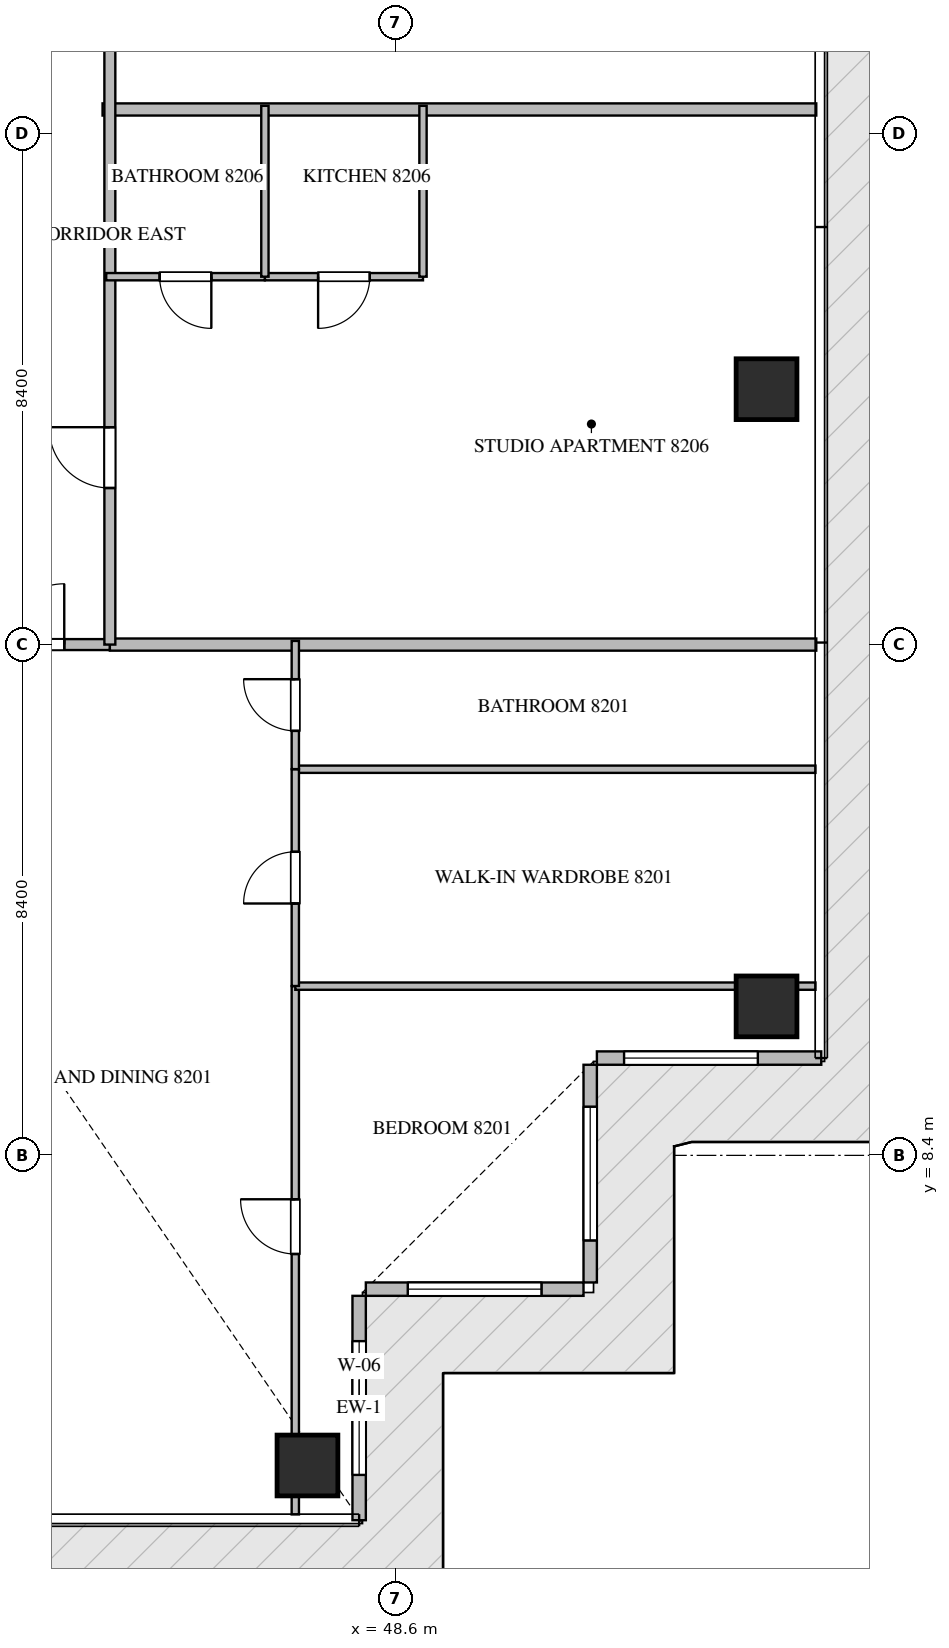
"""IFC4 building model, lengths in metres.
Left out: names, types, materials, properties, quantities, classifications, styles, units other than length and angle.
Written with IfcOpenShell. Run it as: python <this file> out.ifc"""

import sys

from ifc_helpers import new_model, si_unit, direction, frame, frame_2d, origin, origin_2d, place, context, subcontext, project, spatial, rectangle, extrude, source, transform, mapped, element, fill, save


model = new_model("IFC4")
c1 = context("Model", 3, precision=1e-05, world=origin(), true_north=direction((0.0, 1.0)))
c2 = subcontext(c1, "Body", "Model", "MODEL_VIEW")
j1 = project(units=[si_unit("LENGTHUNIT", "METRE"), si_unit("PLANEANGLEUNIT", "RADIAN")], contexts=[c1])
p1 = place(None, origin())
s1 = spatial("IfcSite", under=j1, at=p1, CompositionType="ELEMENT")
p2 = place(p1, origin())
s2 = spatial("IfcBuilding", under=s1, at=p2, CompositionType="ELEMENT")
p3 = place(p2, frame((0.0, 0.0, 329.9)))
s3 = spatial("IfcBuildingStorey", under=s2, at=p3, CompositionType="ELEMENT", Elevation=329.9)
m1 = source(origin(), c2, "Body", "SweptSolid", [
    extrude(rectangle(XDim=1.0, YDim=1.0, at=origin_2d()), origin(), (0.0, 0.0, 1.0), 4.05),
])
for number, where, z_axis, x_axis in (
    (1, (47.15, 3.3, -0.26), (0.0, 0.0, 1.0), (1.0, 0.0, 0.0)),
    (2, (54.7, 10.85, -0.26), (0.0, 0.0, 1.0), (1.0, 0.0, 0.0)),
    (3, (54.7, 21.0, -0.26), (0.0, 0.0, 1.0), (1.0, 0.0, 0.0)),
):
    element("IfcColumn", number, at=place(p3, frame(where, z_axis=z_axis, x_axis=x_axis)), inside=s3, PredefinedType="COLUMN", context=c2, shape_type="MappedRepresentation", body=[
        mapped(m1, transform((0.0, 0.0, 0.0), scale=1.0)),
    ])
p4 = place(p3, frame((48.0, 2.4, 0.0), z_axis=(0.0, 0.0, 1.0), x_axis=(0.0, 1.0, 0.0)))
e4 = element("IfcWall", 4, at=p4, inside=s3, PredefinedType="ELEMENTEDWALL", context=c2, shape_type="SweptSolid", body=[
    extrude(rectangle(XDim=3.69, YDim=0.22, at=frame_2d((1.845, 0.0))), origin(), (0.0, 0.0, 1.0), 3.775),
])
p5 = place(p4, frame((0.745, 0.0, 0.65)))
e5 = element("IfcOpeningElement", 5, at=p5, cuts=e4, PredefinedType="OPENING", context=c2, shape_type="SweptSolid", body=[
    extrude(rectangle(XDim=2.2, YDim=2.4, at=frame_2d((1.1, 1.2))), frame((0.0, 0.12, 0.0), z_axis=(0.0, -1.0, 0.0), x_axis=(1.0, 0.0, 0.0)), (0.0, 0.0, 1.0), 0.24),
])
p6 = place(p3, frame((48.11, 6.2, 0.0), z_axis=(0.0, 0.0, 1.0), x_axis=(1.0, 0.0, 0.0)))
e6 = element("IfcWall", 6, at=p6, inside=s3, PredefinedType="ELEMENTEDWALL", context=c2, shape_type="SweptSolid", body=[
    extrude(rectangle(XDim=3.58, YDim=0.22, at=frame_2d((1.79, 0.0))), origin(), (0.0, 0.0, 1.0), 3.775),
])
p7 = place(p6, frame((0.69, 0.0, 0.65)))
e7 = element("IfcOpeningElement", 7, at=p7, cuts=e6, PredefinedType="OPENING", context=c2, shape_type="SweptSolid", body=[
    extrude(rectangle(XDim=2.2, YDim=2.4, at=frame_2d((1.1, 1.2))), frame((0.0, 0.12, 0.0), z_axis=(0.0, -1.0, 0.0), x_axis=(1.0, 0.0, 0.0)), (0.0, 0.0, 1.0), 0.24),
])
p8 = place(p3, frame((51.8, 6.31, 0.0), z_axis=(0.0, 0.0, 1.0), x_axis=(0.0, 1.0, 0.0)))
e8 = element("IfcWall", 8, at=p8, inside=s3, PredefinedType="ELEMENTEDWALL", context=c2, shape_type="SweptSolid", body=[
    extrude(rectangle(XDim=3.58, YDim=0.22, at=frame_2d((1.79, 0.0))), origin(), (0.0, 0.0, 1.0), 3.775),
])
p9 = place(p8, frame((0.69, 0.0, 0.65)))
e9 = element("IfcOpeningElement", 9, at=p9, cuts=e8, PredefinedType="OPENING", context=c2, shape_type="SweptSolid", body=[
    extrude(rectangle(XDim=2.2, YDim=2.4, at=frame_2d((1.1, 1.2))), frame((0.0, 0.12, 0.0), z_axis=(0.0, -1.0, 0.0), x_axis=(1.0, 0.0, 0.0)), (0.0, 0.0, 1.0), 0.24),
])
p10 = place(p3, frame((51.91, 10.0, 0.0), z_axis=(0.0, 0.0, 1.0), x_axis=(1.0, 0.0, 0.0)))
e10 = element("IfcWall", 10, at=p10, inside=s3, PredefinedType="ELEMENTEDWALL", context=c2, shape_type="SweptSolid", body=[
    extrude(rectangle(XDim=3.69, YDim=0.22, at=frame_2d((1.845, 0.0))), origin(), (0.0, 0.0, 1.0), 3.775),
])
p11 = place(p10, frame((0.447, 0.0, 0.65)))
e11 = element("IfcOpeningElement", 11, at=p11, cuts=e10, PredefinedType="OPENING", context=c2, shape_type="SweptSolid", body=[
    extrude(rectangle(XDim=2.2, YDim=2.4, at=frame_2d((1.1, 1.2))), frame((0.0, 0.12, 0.0), z_axis=(0.0, -1.0, 0.0), x_axis=(1.0, 0.0, 0.0)), (0.0, 0.0, 1.0), 0.24),
])
p12 = place(p3, frame((43.78, 25.6, 0.0), z_axis=(0.0, 0.0, 1.0), x_axis=(1.0, 0.0, 0.0)))
e12 = element("IfcWall", 12, at=p12, inside=s3, PredefinedType="PARTITIONING", context=c2, shape_type="SweptSolid", body=[
    extrude(rectangle(XDim=11.738, YDim=0.2, at=frame_2d((5.869, 0.0))), origin(), (0.0, 0.0, 1.0), 3.79),
])
p13 = place(p3, frame((43.9, 16.8, 0.0), z_axis=(0.0, 0.0, 1.0), x_axis=(1.0, 0.0, 0.0)))
e13 = element("IfcWall", 13, at=p13, inside=s3, PredefinedType="PARTITIONING", context=c2, shape_type="SweptSolid", body=[
    extrude(rectangle(XDim=11.618, YDim=0.2, at=frame_2d((5.809, 0.0))), origin(), (0.0, 0.0, 1.0), 3.79),
])
p14 = place(p3, frame((41.402, 16.8, 0.0), z_axis=(0.0, 0.0, 1.0), x_axis=(1.0, 0.0, 0.0)))
e14 = element("IfcWall", 14, at=p14, inside=s3, PredefinedType="PARTITIONING", context=c2, shape_type="SweptSolid", body=[
    extrude(rectangle(XDim=2.496, YDim=0.18, at=frame_2d((1.248, 0.0))), origin(), (0.0, 0.0, 1.0), 3.79),
])
p15 = place(p14, frame((0.748, 0.0, 0.0)))
e15 = element("IfcOpeningElement", 15, at=p15, cuts=e14, PredefinedType="OPENING", context=c2, shape_type="SweptSolid", body=[
    extrude(rectangle(XDim=1.0, YDim=2.15, at=frame_2d((0.5, 1.075))), frame((0.0, 0.1, 0.0), z_axis=(0.0, -1.0, 0.0), x_axis=(1.0, 0.0, 0.0)), (0.0, 0.0, 1.0), 0.2),
])
p16 = place(p3, frame((43.9, 16.8, 0.0), z_axis=(0.0, 0.0, 1.0), x_axis=(0.0, 1.0, 0.0)))
e16 = element("IfcWall", 16, at=p16, inside=s3, PredefinedType="PARTITIONING", context=c2, shape_type="SweptSolid", body=[
    extrude(rectangle(XDim=16.8, YDim=0.18, at=frame_2d((8.4, 0.0))), origin(), (0.0, 0.0, 1.0), 3.79),
])
p17 = place(p16, frame((2.575, 0.0, 0.0)))
e17 = element("IfcOpeningElement", 17, at=p17, cuts=e16, PredefinedType="OPENING", context=c2, shape_type="SweptSolid", body=[
    extrude(rectangle(XDim=1.0, YDim=2.15, at=frame_2d((0.5, 1.075))), frame((0.0, 0.1, 0.0), z_axis=(0.0, -1.0, 0.0), x_axis=(1.0, 0.0, 0.0)), (0.0, 0.0, 1.0), 0.2),
])
p18 = place(p16, frame((10.997, 0.0, 0.0)))
e18 = element("IfcOpeningElement", 18, at=p18, cuts=e16, PredefinedType="OPENING", context=c2, shape_type="SweptSolid", body=[
    extrude(rectangle(XDim=1.0, YDim=2.15, at=frame_2d((0.5, 1.075))), frame((0.0, 0.1, 0.0), z_axis=(0.0, -1.0, 0.0), x_axis=(1.0, 0.0, 0.0)), (0.0, 0.0, 1.0), 0.2),
])
p19 = place(p3, frame((46.95, 2.495, 0.0), z_axis=(0.0, 0.0, 1.0), x_axis=(0.0, 1.0, 0.0)))
e19 = element("IfcWall", 19, at=p19, inside=s3, PredefinedType="PARTITIONING", context=c2, shape_type="SweptSolid", body=[
    extrude(rectangle(XDim=8.688, YDim=0.12, at=frame_2d((4.344, 0.0))), origin(), (0.0, 0.0, 1.0), 3.292),
])
p20 = place(p19, frame((4.283, 0.0, 0.0)))
e20 = element("IfcOpeningElement", 20, at=p20, cuts=e19, PredefinedType="OPENING", context=c2, shape_type="SweptSolid", body=[
    extrude(rectangle(XDim=0.9, YDim=2.1, at=frame_2d((0.45, 1.05))), frame((0.0, 0.07, 0.0), z_axis=(0.0, -1.0, 0.0), x_axis=(1.0, 0.0, 0.0)), (0.0, 0.0, 1.0), 0.14),
])
for number, where, z_axis, x_axis in (
    (21, (46.95, 11.183, 0.0), (0.0, 0.0, 1.0), (1.0, 0.0, 0.0)),
    (22, (46.95, 14.75, 0.0), (0.0, 0.0, 1.0), (1.0, 0.0, 0.0)),
):
    element("IfcWall", number, at=place(p3, frame(where, z_axis=z_axis, x_axis=x_axis)), inside=s3, PredefinedType="PARTITIONING", context=c2, shape_type="SweptSolid", body=[
        extrude(rectangle(XDim=8.555, YDim=0.12, at=frame_2d((4.277, 0.0))), origin(), (0.0, 0.0, 1.0), 3.79),
    ])
p21 = place(p3, frame((46.95, 11.185, 0.0), z_axis=(0.0, 0.0, 1.0), x_axis=(0.0, 1.0, 0.0)))
e23 = element("IfcWall", 23, at=p21, inside=s3, PredefinedType="PARTITIONING", context=c2, shape_type="SweptSolid", body=[
    extrude(rectangle(XDim=3.565, YDim=0.12, at=frame_2d((1.782, 0.0))), origin(), (0.0, 0.0, 1.0), 3.372),
])
p22 = place(p21, frame((1.357, 0.0, 0.0)))
e24 = element("IfcOpeningElement", 24, at=p22, cuts=e23, PredefinedType="OPENING", context=c2, shape_type="SweptSolid", body=[
    extrude(rectangle(XDim=0.85, YDim=2.1, at=frame_2d((0.425, 1.05))), frame((0.0, 0.07, 0.0), z_axis=(0.0, -1.0, 0.0), x_axis=(1.0, 0.0, 0.0)), (0.0, 0.0, 1.0), 0.14),
])
p23 = place(p3, frame((46.95, 14.752, 0.0), z_axis=(0.0, 0.0, 1.0), x_axis=(0.0, 1.0, 0.0)))
e25 = element("IfcWall", 25, at=p23, inside=s3, PredefinedType="PARTITIONING", context=c2, shape_type="SweptSolid", body=[
    extrude(rectangle(XDim=2.108, YDim=0.12, at=frame_2d((1.054, 0.0))), origin(), (0.0, 0.0, 1.0), 3.372),
])
p24 = place(p23, frame((0.629, 0.0, 0.0)))
e26 = element("IfcOpeningElement", 26, at=p24, cuts=e25, PredefinedType="OPENING", context=c2, shape_type="SweptSolid", body=[
    extrude(rectangle(XDim=0.85, YDim=2.1, at=frame_2d((0.425, 1.05))), frame((0.0, 0.07, 0.0), z_axis=(0.0, -1.0, 0.0), x_axis=(1.0, 0.0, 0.0)), (0.0, 0.0, 1.0), 0.14),
])
p25 = place(p3, frame((49.05, 22.85, 0.0), z_axis=(0.0, 0.0, 1.0), x_axis=(-1.0, 0.0, 0.0)))
e27 = element("IfcWall", 27, at=p25, inside=s3, PredefinedType="PARTITIONING", context=c2, shape_type="SweptSolid", body=[
    extrude(rectangle(XDim=2.6, YDim=0.12, at=frame_2d((1.3, 0.0))), origin(), (0.0, 0.0, 1.0), 3.79),
])
p26 = place(p25, frame((0.875, 0.0, 0.0)))
e28 = element("IfcOpeningElement", 28, at=p26, cuts=e27, PredefinedType="OPENING", context=c2, shape_type="SweptSolid", body=[
    extrude(rectangle(XDim=0.85, YDim=2.1, at=frame_2d((0.425, 1.05))), frame((0.0, 0.07, 0.0), z_axis=(0.0, -1.0, 0.0), x_axis=(1.0, 0.0, 0.0)), (0.0, 0.0, 1.0), 0.14),
])
p27 = place(p3, frame((46.448, 22.85, 0.0), z_axis=(0.0, 0.0, 1.0), x_axis=(-1.0, 0.0, 0.0)))
e29 = element("IfcWall", 29, at=p27, inside=s3, PredefinedType="PARTITIONING", context=c2, shape_type="SweptSolid", body=[
    extrude(rectangle(XDim=2.608, YDim=0.12, at=frame_2d((1.304, 0.0))), origin(), (0.0, 0.0, 1.0), 3.79),
])
p28 = place(p27, frame((0.879, 0.0, 0.0)))
e30 = element("IfcOpeningElement", 30, at=p28, cuts=e29, PredefinedType="OPENING", context=c2, shape_type="SweptSolid", body=[
    extrude(rectangle(XDim=0.85, YDim=2.1, at=frame_2d((0.425, 1.05))), frame((0.0, 0.07, 0.0), z_axis=(0.0, -1.0, 0.0), x_axis=(1.0, 0.0, 0.0)), (0.0, 0.0, 1.0), 0.14),
])
for number, where, z_axis, x_axis in (
    (31, (46.45, 22.85, 0.0), (0.0, 0.0, 1.0), (0.0, 1.0, 0.0)),
    (32, (49.05, 22.85, 0.0), (0.0, 0.0, 1.0), (0.0, 1.0, 0.0)),
):
    element("IfcWall", number, at=place(p3, frame(where, z_axis=z_axis, x_axis=x_axis)), inside=s3, PredefinedType="PARTITIONING", context=c2, shape_type="SweptSolid", body=[
        extrude(rectangle(XDim=2.81, YDim=0.12, at=frame_2d((1.405, 0.0))), origin(), (0.0, 0.0, 1.0), 3.79),
    ])
m2 = source(origin(), c2, "Body", "SweptSolid", [
    extrude(rectangle(XDim=2.2, YDim=2.4, at=frame_2d((1.1, 1.2))), frame((0.0, 0.03, 0.0), z_axis=(0.0, -1.0, 0.0), x_axis=(1.0, 0.0, 0.0)), (0.0, 0.0, 1.0), 0.06),
])
p29 = place(p5, origin())
e33 = element("IfcWindow", 33, at=p29, inside=s3, PartitioningType="SINGLE_PANEL", PredefinedType="WINDOW", context=c2, shape_type="MappedRepresentation", body=[
    mapped(m2, transform((0.0, 0.0, 0.0), scale=1.0)),
])
fill(e5, e33)
p30 = place(p7, origin())
e34 = element("IfcWindow", 34, at=p30, inside=s3, PartitioningType="SINGLE_PANEL", PredefinedType="WINDOW", context=c2, shape_type="MappedRepresentation", body=[
    mapped(m2, transform((0.0, 0.0, 0.0), scale=1.0)),
])
fill(e7, e34)
p31 = place(p9, origin())
e35 = element("IfcWindow", 35, at=p31, inside=s3, PartitioningType="SINGLE_PANEL", PredefinedType="WINDOW", context=c2, shape_type="MappedRepresentation", body=[
    mapped(m2, transform((0.0, 0.0, 0.0), scale=1.0)),
])
fill(e9, e35)
p32 = place(p11, origin())
e36 = element("IfcWindow", 36, at=p32, inside=s3, PartitioningType="SINGLE_PANEL", PredefinedType="WINDOW", context=c2, shape_type="MappedRepresentation", body=[
    mapped(m2, transform((0.0, 0.0, 0.0), scale=1.0)),
])
fill(e11, e36)
m3 = source(origin(), c2, "Body", "SweptSolid", [
    extrude(rectangle(XDim=1.0, YDim=2.15, at=frame_2d((0.5, 1.075))), frame((0.0, 0.025, 0.0), z_axis=(0.0, -1.0, 0.0), x_axis=(1.0, 0.0, 0.0)), (0.0, 0.0, 1.0), 0.05),
])
p33 = place(p15, origin())
e37 = element("IfcDoor", 37, at=p33, inside=s3, OperationType="SINGLE_SWING_RIGHT", PredefinedType="DOOR", context=c2, shape_type="MappedRepresentation", body=[
    mapped(m3, transform((0.0, 0.0, 0.0), scale=1.0)),
])
fill(e15, e37)
p34 = place(p17, origin())
e38 = element("IfcDoor", 38, at=p34, inside=s3, OperationType="SINGLE_SWING_RIGHT", PredefinedType="DOOR", context=c2, shape_type="MappedRepresentation", body=[
    mapped(m3, transform((0.0, 0.0, 0.0), scale=1.0)),
])
fill(e17, e38)
m4 = source(origin(), c2, "Body", "SweptSolid", [
    extrude(rectangle(XDim=0.9, YDim=2.1, at=frame_2d((0.45, 1.05))), frame((0.0, 0.025, 0.0), z_axis=(0.0, -1.0, 0.0), x_axis=(1.0, 0.0, 0.0)), (0.0, 0.0, 1.0), 0.05),
])
p35 = place(p20, origin())
e39 = element("IfcDoor", 39, at=p35, inside=s3, OperationType="SINGLE_SWING_RIGHT", PredefinedType="DOOR", context=c2, shape_type="MappedRepresentation", body=[
    mapped(m4, transform((0.0, 0.0, 0.0), scale=1.0)),
])
fill(e20, e39)
m5 = source(origin(), c2, "Body", "SweptSolid", [
    extrude(rectangle(XDim=0.85, YDim=2.1, at=frame_2d((0.425, 1.05))), frame((0.0, 0.025, 0.0), z_axis=(0.0, -1.0, 0.0), x_axis=(1.0, 0.0, 0.0)), (0.0, 0.0, 1.0), 0.05),
])
p36 = place(p22, origin())
e40 = element("IfcDoor", 40, at=p36, inside=s3, OperationType="SINGLE_SWING_LEFT", PredefinedType="DOOR", context=c2, shape_type="MappedRepresentation", body=[
    mapped(m5, transform((0.0, 0.0, 0.0), scale=1.0)),
])
fill(e24, e40)
p37 = place(p24, origin())
e41 = element("IfcDoor", 41, at=p37, inside=s3, OperationType="SINGLE_SWING_RIGHT", PredefinedType="DOOR", context=c2, shape_type="MappedRepresentation", body=[
    mapped(m5, transform((0.0, 0.0, 0.0), scale=1.0)),
])
fill(e26, e41)
p38 = place(p26, origin())
e42 = element("IfcDoor", 42, at=p38, inside=s3, OperationType="SINGLE_SWING_RIGHT", PredefinedType="DOOR", context=c2, shape_type="MappedRepresentation", body=[
    mapped(m5, transform((0.0, 0.0, 0.0), scale=1.0)),
])
fill(e28, e42)
p39 = place(p28, origin())
e43 = element("IfcDoor", 43, at=p39, inside=s3, OperationType="SINGLE_SWING_LEFT", PredefinedType="DOOR", context=c2, shape_type="MappedRepresentation", body=[
    mapped(m5, transform((0.0, 0.0, 0.0), scale=1.0)),
])
fill(e30, e43)
save(model, sys.argv[1])
